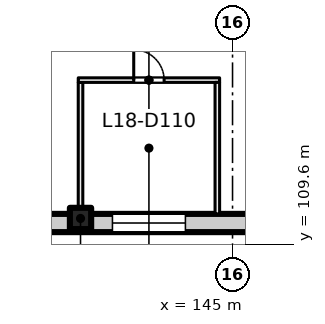
"""IFC4 building model, lengths in metres.
Left out: names, types, materials, properties, quantities, classifications, styles, units other than length and angle.
Written with IfcOpenShell. Run it as: python <this file> out.ifc"""

import sys

from ifc_helpers import new_model, si_unit, direction, frame, frame_2d, origin, origin_2d, place, context, subcontext, project, spatial, rectangle, extrude, element, fill, save


model = new_model("IFC4")
c1 = context("Model", 3, precision=1e-05, world=origin(), true_north=direction((0.0, 1.0)))
c2 = subcontext(c1, "Body", "Model", "MODEL_VIEW")
j1 = project(units=[si_unit("LENGTHUNIT", "METRE"), si_unit("PLANEANGLEUNIT", "RADIAN")], contexts=[c1])
p1 = place(None, origin())
s1 = spatial("IfcSite", under=j1, at=p1, CompositionType="ELEMENT")
p2 = place(p1, origin())
s2 = spatial("IfcBuilding", under=s1, at=p2, CompositionType="ELEMENT")
p3 = place(p2, frame((0.0, 0.0, 81.0)))
s3 = spatial("IfcBuildingStorey", under=s2, at=p3, CompositionType="ELEMENT", Elevation=81.0)
p4 = place(p3, frame((140.0, 110.45, 0.0), z_axis=(0.0, 0.0, 1.0), x_axis=(1.0, 0.0, 0.0)))
e1 = element("IfcColumn", 1, at=p4, inside=s3, PredefinedType="COLUMN", context=c2, shape_type="SweptSolid", body=[
    extrude(rectangle(XDim=0.7, YDim=0.7, at=origin_2d()), origin(), (0.0, 0.0, 1.0), 4.0),
])
p5 = place(p3, frame((162.93, 110.3, 0.0), z_axis=(0.0, 0.0, 1.0), x_axis=(-1.0, 0.0, 0.0)))
e2 = element("IfcWall", 2, at=p5, inside=s3, PredefinedType="SOLIDWALL", context=c2, shape_type="SweptSolid", body=[
    extrude(rectangle(XDim=31.93, YDim=0.6, at=frame_2d((15.965, 0.0))), origin(), (0.0, 0.0, 1.0), 3.625),
])
p6 = place(p5, frame((1.48, 0.0, 0.9)))
e3 = element("IfcOpeningElement", 3, at=p6, cuts=e2, PredefinedType="OPENING", context=c2, shape_type="SweptSolid", body=[
    extrude(rectangle(XDim=2.4, YDim=2.4, at=frame_2d((1.2, 1.2))), frame((0.0, 0.31, 0.0), z_axis=(0.0, -1.0, 0.0), x_axis=(1.0, 0.0, 0.0)), (0.0, 0.0, 1.0), 0.62),
])
p7 = place(p5, frame((5.98, 0.0, 0.9)))
e4 = element("IfcOpeningElement", 4, at=p7, cuts=e2, PredefinedType="OPENING", context=c2, shape_type="SweptSolid", body=[
    extrude(rectangle(XDim=2.4, YDim=2.4, at=frame_2d((1.2, 1.2))), frame((0.0, 0.31, 0.0), z_axis=(0.0, -1.0, 0.0), x_axis=(1.0, 0.0, 0.0)), (0.0, 0.0, 1.0), 0.62),
])
p8 = place(p5, frame((10.48, 0.0, 0.9)))
e5 = element("IfcOpeningElement", 5, at=p8, cuts=e2, PredefinedType="OPENING", context=c2, shape_type="SweptSolid", body=[
    extrude(rectangle(XDim=2.4, YDim=2.4, at=frame_2d((1.2, 1.2))), frame((0.0, 0.31, 0.0), z_axis=(0.0, -1.0, 0.0), x_axis=(1.0, 0.0, 0.0)), (0.0, 0.0, 1.0), 0.62),
])
p9 = place(p5, frame((14.98, 0.0, 0.9)))
e6 = element("IfcOpeningElement", 6, at=p9, cuts=e2, PredefinedType="OPENING", context=c2, shape_type="SweptSolid", body=[
    extrude(rectangle(XDim=2.4, YDim=2.4, at=frame_2d((1.2, 1.2))), frame((0.0, 0.31, 0.0), z_axis=(0.0, -1.0, 0.0), x_axis=(1.0, 0.0, 0.0)), (0.0, 0.0, 1.0), 0.62),
])
p10 = place(p5, frame((19.48, 0.0, 0.9)))
e7 = element("IfcOpeningElement", 7, at=p10, cuts=e2, PredefinedType="OPENING", context=c2, shape_type="SweptSolid", body=[
    extrude(rectangle(XDim=2.4, YDim=2.4, at=frame_2d((1.2, 1.2))), frame((0.0, 0.31, 0.0), z_axis=(0.0, -1.0, 0.0), x_axis=(1.0, 0.0, 0.0)), (0.0, 0.0, 1.0), 0.62),
])
p11 = place(p5, frame((23.98, 0.0, 0.9)))
e8 = element("IfcOpeningElement", 8, at=p11, cuts=e2, PredefinedType="OPENING", context=c2, shape_type="SweptSolid", body=[
    extrude(rectangle(XDim=2.4, YDim=2.4, at=frame_2d((1.2, 1.2))), frame((0.0, 0.31, 0.0), z_axis=(0.0, -1.0, 0.0), x_axis=(1.0, 0.0, 0.0)), (0.0, 0.0, 1.0), 0.62),
])
p12 = place(p5, frame((28.48, 0.0, 0.9)))
e9 = element("IfcOpeningElement", 9, at=p12, cuts=e2, PredefinedType="OPENING", context=c2, shape_type="SweptSolid", body=[
    extrude(rectangle(XDim=2.4, YDim=2.4, at=frame_2d((1.2, 1.2))), frame((0.0, 0.31, 0.0), z_axis=(0.0, -1.0, 0.0), x_axis=(1.0, 0.0, 0.0)), (0.0, 0.0, 1.0), 0.62),
])
p13 = place(p3, frame((140.0, 110.6, 0.0), z_axis=(0.0, 0.0, 1.0), x_axis=(0.0, 1.0, 0.0)))
e10 = element("IfcWall", 10, at=p13, inside=s3, PredefinedType="PARTITIONING", context=c2, shape_type="SweptSolid", body=[
    extrude(rectangle(XDim=4.325, YDim=0.15, at=frame_2d((2.163, 0.0))), origin(), (0.0, 0.0, 1.0), 3.625),
])
p14 = place(p3, frame((139.925, 115.0, 0.0), z_axis=(0.0, 0.0, 1.0), x_axis=(1.0, 0.0, 0.0)))
e11 = element("IfcWall", 11, at=p14, inside=s3, PredefinedType="PARTITIONING", context=c2, shape_type="SweptSolid", body=[
    extrude(rectangle(XDim=4.65, YDim=0.15, at=frame_2d((2.325, 0.0))), origin(), (0.0, 0.0, 1.0), 3.625),
])
p15 = place(p14, frame((1.825, 0.0, 0.0)))
e12 = element("IfcOpeningElement", 12, at=p15, cuts=e11, PredefinedType="OPENING", context=c2, shape_type="SweptSolid", body=[
    extrude(rectangle(XDim=1.0, YDim=2.1, at=frame_2d((0.5, 1.05))), frame((0.0, 0.085, 0.0), z_axis=(0.0, -1.0, 0.0), x_axis=(1.0, 0.0, 0.0)), (0.0, 0.0, 1.0), 0.17),
])
p16 = place(p3, frame((144.5, 114.925, 0.0), z_axis=(0.0, 0.0, 1.0), x_axis=(0.0, -1.0, 0.0)))
e13 = element("IfcWall", 13, at=p16, inside=s3, PredefinedType="PARTITIONING", context=c2, shape_type="SweptSolid", body=[
    extrude(rectangle(XDim=4.325, YDim=0.15, at=frame_2d((2.163, 0.0))), origin(), (0.0, 0.0, 1.0), 3.625),
])
p17 = place(p10, origin())
e14 = element("IfcWindow", 14, at=p17, inside=s3, PartitioningType="SINGLE_PANEL", PredefinedType="WINDOW", context=c2, shape_type="SweptSolid", body=[
    extrude(rectangle(XDim=2.4, YDim=2.4, at=frame_2d((1.2, 1.2))), frame((0.0, 0.03, 0.0), z_axis=(0.0, -1.0, 0.0), x_axis=(1.0, 0.0, 0.0)), (0.0, 0.0, 1.0), 0.06),
])
fill(e7, e14)
p18 = place(p15, origin())
e15 = element("IfcDoor", 15, at=p18, inside=s3, OperationType="SINGLE_SWING_LEFT", PredefinedType="DOOR", context=c2, shape_type="SweptSolid", body=[
    extrude(rectangle(XDim=1.0, YDim=2.1, at=frame_2d((0.5, 1.05))), frame((0.0, 0.025, 0.0), z_axis=(0.0, -1.0, 0.0), x_axis=(1.0, 0.0, 0.0)), (0.0, 0.0, 1.0), 0.05),
])
fill(e12, e15)
save(model, sys.argv[1])
